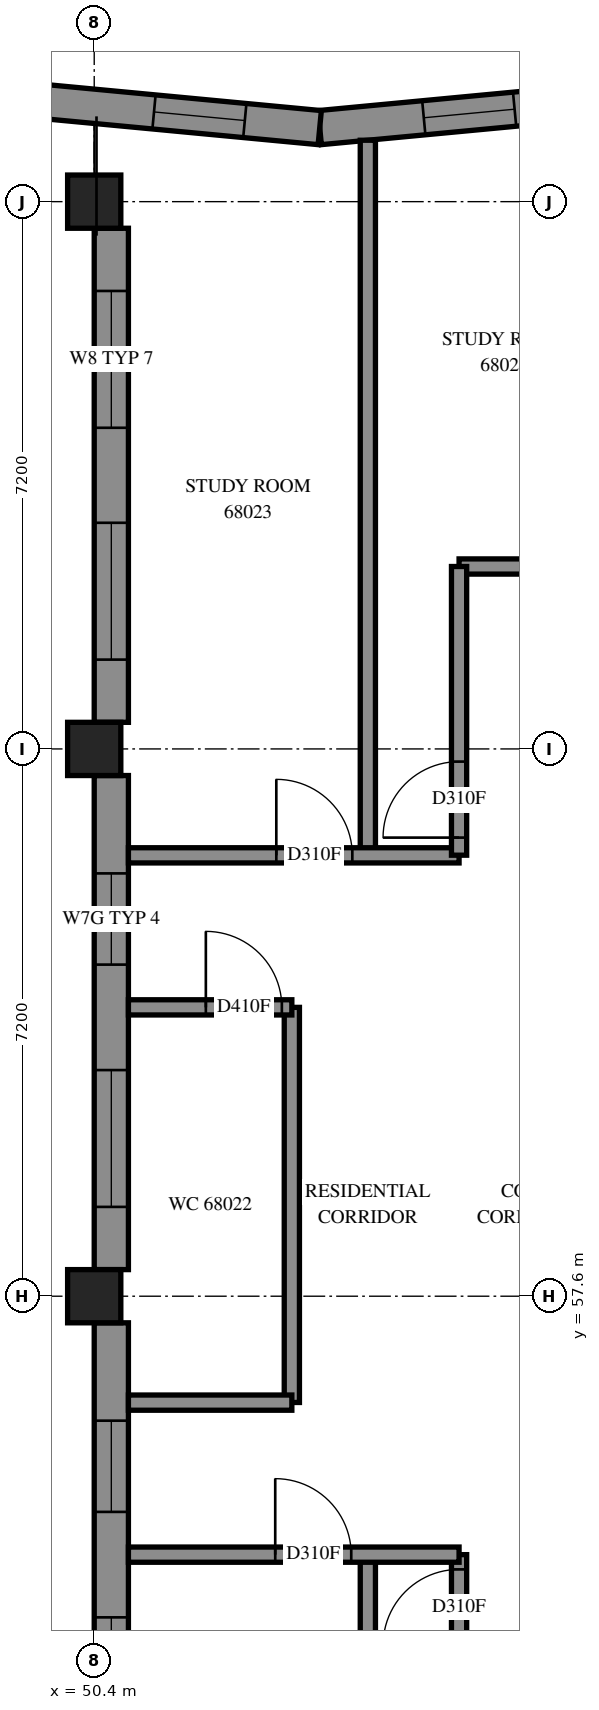
"""IFC4 building model, lengths in metres.
Left out: names, types, materials, properties, quantities, classifications, styles, units other than length and angle.
Written with IfcOpenShell. Run it as: python <this file> out.ifc"""

import sys

from ifc_helpers import new_model, si_unit, direction, frame, frame_2d, origin, origin_2d, place, context, subcontext, project, spatial, polyline, rectangle, outline, extrude, element, fill, save


model = new_model("IFC4")
c1 = context("Model", 3, precision=1e-05, world=origin(), true_north=direction((0.0, 1.0)))
c2 = subcontext(c1, "Body", "Model", "MODEL_VIEW")
j1 = project(units=[si_unit("LENGTHUNIT", "METRE"), si_unit("PLANEANGLEUNIT", "RADIAN")], contexts=[c1])
p1 = place(None, origin())
s1 = spatial("IfcSite", under=j1, at=p1, CompositionType="ELEMENT")
p2 = place(p1, origin())
s2 = spatial("IfcBuilding", under=s1, at=p2, CompositionType="ELEMENT")
p3 = place(p2, frame((0.0, 0.0, 250.6)))
s3 = spatial("IfcBuildingStorey", under=s2, at=p3, CompositionType="ELEMENT", Elevation=250.6)
for number, where, z_axis, x_axis in (
    (1, (50.4, 57.6, 0.0), (0.0, 0.0, 1.0), (1.0, 0.0, 0.0)),
    (2, (50.4, 64.8, 0.0), (0.0, 0.0, 1.0), (1.0, 0.0, 0.0)),
    (3, (50.4, 72.0, 0.0), (0.0, 0.0, 1.0), (1.0, 0.0, 0.0)),
):
    element("IfcColumn", number, at=place(p3, frame(where, z_axis=z_axis, x_axis=x_axis)), inside=s3, PredefinedType="COLUMN", context=c2, shape_type="SweptSolid", body=[
        extrude(rectangle(XDim=0.7, YDim=0.7, at=origin_2d()), origin(), (0.0, 0.0, 1.0), 3.1),
    ])
p4 = place(p3, frame((57.185, 73.335, 0.0), z_axis=(0.0, 0.0, 1.0), x_axis=(-0.9955603917, -0.0941249513, 0.0)))
e4 = element("IfcWall", 4, at=p4, inside=s3, PredefinedType="SOLIDWALL", context=c2, shape_type="SweptSolid", body=[
    extrude(outline(polyline([(-0.021, -0.225), (3.814, -0.225), (3.857, 0.225), (0.021, 0.225), (-0.021, -0.225)])), origin(), (0.0, 0.0, 1.0), 3.1),
])
p5 = place(p4, frame((1.26, 0.0, 0.45)))
e5 = element("IfcOpeningElement", 5, at=p5, cuts=e4, PredefinedType="OPENING", context=c2, shape_type="SweptSolid", body=[
    extrude(rectangle(XDim=1.2, YDim=2.55, at=frame_2d((0.6, 1.275))), frame((0.0, 0.235, 0.0), z_axis=(0.0, -1.0, 0.0), x_axis=(1.0, 0.0, 0.0)), (0.0, 0.0, 1.0), 0.47),
])
p6 = place(p3, frame((53.367, 72.974, 0.0), z_axis=(0.0, 0.0, 1.0), x_axis=(-0.9955603917, 0.0941249513, 0.0)))
e6 = element("IfcWall", 6, at=p6, inside=s3, PredefinedType="SOLIDWALL", context=c2, shape_type="SweptSolid", body=[
    extrude(outline(polyline([(0.021, -0.225), (3.857, -0.225), (3.814, 0.225), (-0.021, 0.225), (0.021, -0.225)])), origin(), (0.0, 0.0, 1.0), 3.1),
])
p7 = place(p6, frame((0.99, 0.0, 0.45)))
e7 = element("IfcOpeningElement", 7, at=p7, cuts=e6, PredefinedType="OPENING", context=c2, shape_type="SweptSolid", body=[
    extrude(rectangle(XDim=1.2, YDim=2.55, at=frame_2d((0.6, 1.275))), frame((0.0, 0.235, 0.0), z_axis=(0.0, -1.0, 0.0), x_axis=(1.0, 0.0, 0.0)), (0.0, 0.0, 1.0), 0.47),
])
p8 = place(p3, frame((50.625, 71.65, 0.0), z_axis=(0.0, 0.0, 1.0), x_axis=(0.0, -1.0, 0.0)))
e8 = element("IfcWall", 8, at=p8, inside=s3, PredefinedType="SOLIDWALL", context=c2, shape_type="SweptSolid", body=[
    extrude(rectangle(XDim=6.5, YDim=0.45, at=frame_2d((3.25, 0.0))), origin(), (0.0, 0.0, 1.0), 3.1),
])
p9 = place(p8, frame((0.825, 0.0, 0.7)))
e9 = element("IfcOpeningElement", 9, at=p9, cuts=e8, PredefinedType="OPENING", context=c2, shape_type="SweptSolid", body=[
    extrude(rectangle(XDim=1.8, YDim=1.8, at=frame_2d((0.9, 0.9))), frame((0.0, 0.235, 0.0), z_axis=(0.0, -1.0, 0.0), x_axis=(1.0, 0.0, 0.0)), (0.0, 0.0, 1.0), 0.47),
])
p10 = place(p8, frame((3.875, 0.0, 0.7)))
e10 = element("IfcOpeningElement", 10, at=p10, cuts=e8, PredefinedType="OPENING", context=c2, shape_type="SweptSolid", body=[
    extrude(rectangle(XDim=1.8, YDim=1.8, at=frame_2d((0.9, 0.9))), frame((0.0, 0.235, 0.0), z_axis=(0.0, -1.0, 0.0), x_axis=(1.0, 0.0, 0.0)), (0.0, 0.0, 1.0), 0.47),
])
p11 = place(p3, frame((50.625, 64.45, 0.0), z_axis=(0.0, 0.0, 1.0), x_axis=(0.0, -1.0, 0.0)))
e11 = element("IfcWall", 11, at=p11, inside=s3, PredefinedType="SOLIDWALL", context=c2, shape_type="SweptSolid", body=[
    extrude(rectangle(XDim=6.5, YDim=0.45, at=frame_2d((3.25, 0.0))), origin(), (0.0, 0.0, 1.0), 3.1),
])
p12 = place(p11, frame((3.875, 0.0, 0.7)))
e12 = element("IfcOpeningElement", 12, at=p12, cuts=e11, PredefinedType="OPENING", context=c2, shape_type="SweptSolid", body=[
    extrude(rectangle(XDim=1.8, YDim=1.8, at=frame_2d((0.9, 0.9))), frame((0.0, 0.235, 0.0), z_axis=(0.0, -1.0, 0.0), x_axis=(1.0, 0.0, 0.0)), (0.0, 0.0, 1.0), 0.47),
])
p13 = place(p11, frame((1.288, 0.0, 0.6)))
e13 = element("IfcOpeningElement", 13, at=p13, cuts=e11, PredefinedType="OPENING", context=c2, shape_type="SweptSolid", body=[
    extrude(rectangle(XDim=1.2, YDim=1.9, at=frame_2d((0.6, 0.95))), frame((0.0, 0.235, 0.0), z_axis=(0.0, -1.0, 0.0), x_axis=(1.0, 0.0, 0.0)), (0.0, 0.0, 1.0), 0.47),
])
p14 = place(p3, frame((50.625, 57.25, 0.0), z_axis=(0.0, 0.0, 1.0), x_axis=(0.0, -1.0, 0.0)))
e14 = element("IfcWall", 14, at=p14, inside=s3, PredefinedType="SOLIDWALL", context=c2, shape_type="SweptSolid", body=[
    extrude(rectangle(XDim=6.5, YDim=0.45, at=frame_2d((3.25, 0.0))), origin(), (0.0, 0.0, 1.0), 3.1),
])
p15 = place(p14, frame((3.875, 0.0, 0.7)))
e15 = element("IfcOpeningElement", 15, at=p15, cuts=e14, PredefinedType="OPENING", context=c2, shape_type="SweptSolid", body=[
    extrude(rectangle(XDim=1.8, YDim=1.8, at=frame_2d((0.9, 0.9))), frame((0.0, 0.235, 0.0), z_axis=(0.0, -1.0, 0.0), x_axis=(1.0, 0.0, 0.0)), (0.0, 0.0, 1.0), 0.47),
])
p16 = place(p14, frame((1.288, 0.0, 0.6)))
e16 = element("IfcOpeningElement", 16, at=p16, cuts=e14, PredefinedType="OPENING", context=c2, shape_type="SweptSolid", body=[
    extrude(rectangle(XDim=1.2, YDim=1.9, at=frame_2d((0.6, 0.95))), frame((0.0, 0.235, 0.0), z_axis=(0.0, -1.0, 0.0), x_axis=(1.0, 0.0, 0.0)), (0.0, 0.0, 1.0), 0.47),
])
p17 = place(p3, frame((55.2, 67.2, 0.0), z_axis=(0.0, 0.0, 1.0), x_axis=(1.0, 0.0, 0.0)))
e17 = element("IfcWall", 17, at=p17, inside=s3, PredefinedType="PARTITIONING", context=c2, shape_type="SweptSolid", body=[
    extrude(rectangle(XDim=19.2, YDim=0.2, at=frame_2d((9.6, 0.0))), origin(), (0.0, 0.0, 1.0), 3.1),
])
p18 = place(p17, frame((6.299, 0.0, 0.0)))
e18 = element("IfcOpeningElement", 18, at=p18, cuts=e17, PredefinedType="OPENING", context=c2, shape_type="SweptSolid", body=[
    extrude(rectangle(XDim=0.9, YDim=2.1, at=frame_2d((0.45, 1.05))), frame((0.0, 0.11, 0.0), z_axis=(0.0, -1.0, 0.0), x_axis=(1.0, 0.0, 0.0)), (0.0, 0.0, 1.0), 0.22),
])
p19 = place(p17, frame((13.65, 0.0, 0.0)))
e19 = element("IfcOpeningElement", 19, at=p19, cuts=e17, PredefinedType="OPENING", context=c2, shape_type="SweptSolid", body=[
    extrude(rectangle(XDim=0.9, YDim=2.1, at=frame_2d((0.45, 1.05))), frame((0.0, 0.11, 0.0), z_axis=(0.0, -1.0, 0.0), x_axis=(1.0, 0.0, 0.0)), (0.0, 0.0, 1.0), 0.22),
])
p20 = place(p3, frame((54.0, 42.331, 0.0), z_axis=(0.0, 0.0, 1.0), x_axis=(0.0, 1.0, 0.0)))
e20 = element("IfcWall", 20, at=p20, inside=s3, PredefinedType="PARTITIONING", context=c2, shape_type="SweptSolid", body=[
    extrude(rectangle(XDim=11.87, YDim=0.2, at=frame_2d((5.935, 0.0))), origin(), (0.0, 0.0, 1.0), 3.1),
])
p21 = place(p3, frame((54.0, 63.4, 0.0), z_axis=(0.0, 0.0, 1.0), x_axis=(0.0, 1.0, 0.0)))
e21 = element("IfcWall", 21, at=p21, inside=s3, PredefinedType="PARTITIONING", context=c2, shape_type="SweptSolid", body=[
    extrude(rectangle(XDim=9.408, YDim=0.2, at=frame_2d((4.704, 0.0))), origin(), (0.0, 0.0, 1.0), 3.1),
])
p22 = place(p3, frame((55.2, 48.0, 0.0), z_axis=(0.0, 0.0, 1.0), x_axis=(0.0, 1.0, 0.0)))
e22 = element("IfcWall", 22, at=p22, inside=s3, PredefinedType="PARTITIONING", context=c2, shape_type="SweptSolid", body=[
    extrude(rectangle(XDim=6.2, YDim=0.2, at=frame_2d((3.1, 0.0))), origin(), (0.0, 0.0, 1.0), 3.1),
])
p23 = place(p22, frame((5.006, 0.0, 0.0)))
e23 = element("IfcOpeningElement", 23, at=p23, cuts=e22, PredefinedType="OPENING", context=c2, shape_type="SweptSolid", body=[
    extrude(rectangle(XDim=1.0, YDim=2.1, at=frame_2d((0.5, 1.05))), frame((0.0, 0.11, 0.0), z_axis=(0.0, -1.0, 0.0), x_axis=(1.0, 0.0, 0.0)), (0.0, 0.0, 1.0), 0.22),
])
p24 = place(p3, frame((53.0, 56.202, 0.0), z_axis=(0.0, 0.0, 1.0), x_axis=(0.0, 1.0, 0.0)))
e24 = element("IfcWall", 24, at=p24, inside=s3, PredefinedType="PARTITIONING", context=c2, shape_type="SweptSolid", body=[
    extrude(rectangle(XDim=5.198, YDim=0.2, at=frame_2d((2.599, 0.0))), origin(), (0.0, 0.0, 1.0), 3.1),
])
p25 = place(p3, frame((50.85, 54.2, 0.0), z_axis=(0.0, 0.0, 1.0), x_axis=(1.0, 0.0, 0.0)))
e25 = element("IfcWall", 25, at=p25, inside=s3, PredefinedType="PARTITIONING", context=c2, shape_type="SweptSolid", body=[
    extrude(rectangle(XDim=4.35, YDim=0.2, at=frame_2d((2.175, 0.0))), origin(), (0.0, 0.0, 1.0), 3.1),
])
p26 = place(p25, frame((1.931, 0.0, 0.0)))
e26 = element("IfcOpeningElement", 26, at=p26, cuts=e25, PredefinedType="OPENING", context=c2, shape_type="SweptSolid", body=[
    extrude(rectangle(XDim=1.0, YDim=2.1, at=frame_2d((0.5, 1.05))), frame((0.0, 0.11, 0.0), z_axis=(0.0, -1.0, 0.0), x_axis=(1.0, 0.0, 0.0)), (0.0, 0.0, 1.0), 0.22),
])
p27 = place(p3, frame((50.85, 63.4, 0.0), z_axis=(0.0, 0.0, 1.0), x_axis=(1.0, 0.0, 0.0)))
e27 = element("IfcWall", 27, at=p27, inside=s3, PredefinedType="PARTITIONING", context=c2, shape_type="SweptSolid", body=[
    extrude(rectangle(XDim=4.35, YDim=0.2, at=frame_2d((2.175, 0.0))), origin(), (0.0, 0.0, 1.0), 3.1),
])
p28 = place(p27, frame((1.946, 0.0, 0.0)))
e28 = element("IfcOpeningElement", 28, at=p28, cuts=e27, PredefinedType="OPENING", context=c2, shape_type="SweptSolid", body=[
    extrude(rectangle(XDim=1.0, YDim=2.1, at=frame_2d((0.5, 1.05))), frame((0.0, 0.11, 0.0), z_axis=(0.0, -1.0, 0.0), x_axis=(1.0, 0.0, 0.0)), (0.0, 0.0, 1.0), 0.22),
])
p29 = place(p3, frame((55.2, 63.402, 0.0), z_axis=(0.0, 0.0, 1.0), x_axis=(0.0, 1.0, 0.0)))
e29 = element("IfcWall", 29, at=p29, inside=s3, PredefinedType="PARTITIONING", context=c2, shape_type="SweptSolid", body=[
    extrude(rectangle(XDim=3.798, YDim=0.2, at=frame_2d((1.899, 0.0))), origin(), (0.0, 0.0, 1.0), 3.1),
])
p30 = place(p29, frame((0.231, 0.0, 0.0)))
e30 = element("IfcOpeningElement", 30, at=p30, cuts=e29, PredefinedType="OPENING", context=c2, shape_type="SweptSolid", body=[
    extrude(rectangle(XDim=1.0, YDim=2.1, at=frame_2d((0.5, 1.05))), frame((0.0, 0.11, 0.0), z_axis=(0.0, -1.0, 0.0), x_axis=(1.0, 0.0, 0.0)), (0.0, 0.0, 1.0), 0.22),
])
p31 = place(p3, frame((50.85, 56.2, 0.0), z_axis=(0.0, 0.0, 1.0), x_axis=(1.0, 0.0, 0.0)))
e31 = element("IfcWall", 31, at=p31, inside=s3, PredefinedType="PARTITIONING", context=c2, shape_type="SweptSolid", body=[
    extrude(rectangle(XDim=2.15, YDim=0.2, at=frame_2d((1.075, 0.0))), origin(), (0.0, 0.0, 1.0), 3.1),
])
p32 = place(p3, frame((50.85, 61.4, 0.0), z_axis=(0.0, 0.0, 1.0), x_axis=(1.0, 0.0, 0.0)))
e32 = element("IfcWall", 32, at=p32, inside=s3, PredefinedType="PARTITIONING", context=c2, shape_type="SweptSolid", body=[
    extrude(rectangle(XDim=2.15, YDim=0.2, at=frame_2d((1.075, 0.0))), origin(), (0.0, 0.0, 1.0), 3.1),
])
p33 = place(p32, frame((1.019, 0.0, 0.0)))
e33 = element("IfcOpeningElement", 33, at=p33, cuts=e32, PredefinedType="OPENING", context=c2, shape_type="SweptSolid", body=[
    extrude(rectangle(XDim=1.0, YDim=2.1, at=frame_2d((0.5, 1.05))), frame((0.0, 0.11, 0.0), z_axis=(0.0, -1.0, 0.0), x_axis=(1.0, 0.0, 0.0)), (0.0, 0.0, 1.0), 0.22),
])
p34 = place(p5, origin())
e34 = element("IfcWindow", 34, at=p34, inside=s3, PartitioningType="SINGLE_PANEL", PredefinedType="WINDOW", context=c2, shape_type="SweptSolid", body=[
    extrude(rectangle(XDim=1.2, YDim=2.55, at=frame_2d((0.6, 1.275))), frame((0.0, 0.205, 0.0), z_axis=(0.0, -1.0, 0.0), x_axis=(1.0, 0.0, 0.0)), (0.0, 0.0, 1.0), 0.06),
])
fill(e5, e34)
p35 = place(p7, origin())
e35 = element("IfcWindow", 35, at=p35, inside=s3, PartitioningType="SINGLE_PANEL", PredefinedType="WINDOW", context=c2, shape_type="SweptSolid", body=[
    extrude(rectangle(XDim=1.2, YDim=2.55, at=frame_2d((0.6, 1.275))), frame((0.0, 0.205, 0.0), z_axis=(0.0, -1.0, 0.0), x_axis=(1.0, 0.0, 0.0)), (0.0, 0.0, 1.0), 0.06),
])
fill(e7, e35)
p36 = place(p9, origin())
e36 = element("IfcWindow", 36, at=p36, inside=s3, PartitioningType="SINGLE_PANEL", PredefinedType="WINDOW", context=c2, shape_type="SweptSolid", body=[
    extrude(rectangle(XDim=1.8, YDim=1.8, at=frame_2d((0.9, 0.9))), frame((0.0, 0.205, 0.0), z_axis=(0.0, -1.0, 0.0), x_axis=(1.0, 0.0, 0.0)), (0.0, 0.0, 1.0), 0.06),
])
fill(e9, e36)
p37 = place(p10, origin())
e37 = element("IfcWindow", 37, at=p37, inside=s3, PartitioningType="SINGLE_PANEL", PredefinedType="WINDOW", context=c2, shape_type="SweptSolid", body=[
    extrude(rectangle(XDim=1.8, YDim=1.8, at=frame_2d((0.9, 0.9))), frame((0.0, 0.205, 0.0), z_axis=(0.0, -1.0, 0.0), x_axis=(1.0, 0.0, 0.0)), (0.0, 0.0, 1.0), 0.06),
])
fill(e10, e37)
p38 = place(p12, origin())
e38 = element("IfcWindow", 38, at=p38, inside=s3, PartitioningType="SINGLE_PANEL", PredefinedType="WINDOW", context=c2, shape_type="SweptSolid", body=[
    extrude(rectangle(XDim=1.8, YDim=1.8, at=frame_2d((0.9, 0.9))), frame((0.0, 0.205, 0.0), z_axis=(0.0, -1.0, 0.0), x_axis=(1.0, 0.0, 0.0)), (0.0, 0.0, 1.0), 0.06),
])
fill(e12, e38)
p39 = place(p15, origin())
e39 = element("IfcWindow", 39, at=p39, inside=s3, PartitioningType="SINGLE_PANEL", PredefinedType="WINDOW", context=c2, shape_type="SweptSolid", body=[
    extrude(rectangle(XDim=1.8, YDim=1.8, at=frame_2d((0.9, 0.9))), frame((0.0, 0.205, 0.0), z_axis=(0.0, -1.0, 0.0), x_axis=(1.0, 0.0, 0.0)), (0.0, 0.0, 1.0), 0.06),
])
fill(e15, e39)
p40 = place(p26, origin())
e40 = element("IfcDoor", 40, at=p40, inside=s3, OperationType="SINGLE_SWING_LEFT", PredefinedType="DOOR", context=c2, shape_type="SweptSolid", body=[
    extrude(rectangle(XDim=1.0, YDim=2.1, at=frame_2d((0.5, 1.05))), frame((0.0, 0.025, 0.0), z_axis=(0.0, -1.0, 0.0), x_axis=(1.0, 0.0, 0.0)), (0.0, 0.0, 1.0), 0.05),
])
fill(e26, e40)
p41 = place(p23, origin())
e41 = element("IfcDoor", 41, at=p41, inside=s3, OperationType="SINGLE_SWING_RIGHT", PredefinedType="DOOR", context=c2, shape_type="SweptSolid", body=[
    extrude(rectangle(XDim=1.0, YDim=2.1, at=frame_2d((0.5, 1.05))), frame((0.0, 0.025, 0.0), z_axis=(0.0, -1.0, 0.0), x_axis=(1.0, 0.0, 0.0)), (0.0, 0.0, 1.0), 0.05),
])
fill(e23, e41)
p42 = place(p33, origin())
e42 = element("IfcDoor", 42, at=p42, inside=s3, OperationType="SINGLE_SWING_LEFT", PredefinedType="DOOR", context=c2, shape_type="SweptSolid", body=[
    extrude(rectangle(XDim=1.0, YDim=2.1, at=frame_2d((0.5, 1.05))), frame((0.0, 0.025, 0.0), z_axis=(0.0, -1.0, 0.0), x_axis=(1.0, 0.0, 0.0)), (0.0, 0.0, 1.0), 0.05),
])
fill(e33, e42)
p43 = place(p28, origin())
e43 = element("IfcDoor", 43, at=p43, inside=s3, OperationType="SINGLE_SWING_RIGHT", PredefinedType="DOOR", context=c2, shape_type="SweptSolid", body=[
    extrude(rectangle(XDim=1.0, YDim=2.1, at=frame_2d((0.5, 1.05))), frame((0.0, 0.025, 0.0), z_axis=(0.0, -1.0, 0.0), x_axis=(1.0, 0.0, 0.0)), (0.0, 0.0, 1.0), 0.05),
])
fill(e28, e43)
p44 = place(p30, origin())
e44 = element("IfcDoor", 44, at=p44, inside=s3, OperationType="SINGLE_SWING_LEFT", PredefinedType="DOOR", context=c2, shape_type="SweptSolid", body=[
    extrude(rectangle(XDim=1.0, YDim=2.1, at=frame_2d((0.5, 1.05))), frame((0.0, 0.025, 0.0), z_axis=(0.0, -1.0, 0.0), x_axis=(1.0, 0.0, 0.0)), (0.0, 0.0, 1.0), 0.05),
])
fill(e30, e44)
p45 = place(p13, origin())
e45 = element("IfcWindow", 45, at=p45, inside=s3, PartitioningType="SINGLE_PANEL", PredefinedType="WINDOW", context=c2, shape_type="SweptSolid", body=[
    extrude(rectangle(XDim=1.2, YDim=1.9, at=frame_2d((0.6, 0.95))), frame((0.0, 0.205, 0.0), z_axis=(0.0, -1.0, 0.0), x_axis=(1.0, 0.0, 0.0)), (0.0, 0.0, 1.0), 0.06),
])
fill(e13, e45)
p46 = place(p16, origin())
e46 = element("IfcWindow", 46, at=p46, inside=s3, PartitioningType="SINGLE_PANEL", PredefinedType="WINDOW", context=c2, shape_type="SweptSolid", body=[
    extrude(rectangle(XDim=1.2, YDim=1.9, at=frame_2d((0.6, 0.95))), frame((0.0, 0.205, 0.0), z_axis=(0.0, -1.0, 0.0), x_axis=(1.0, 0.0, 0.0)), (0.0, 0.0, 1.0), 0.06),
])
fill(e16, e46)
save(model, sys.argv[1])
